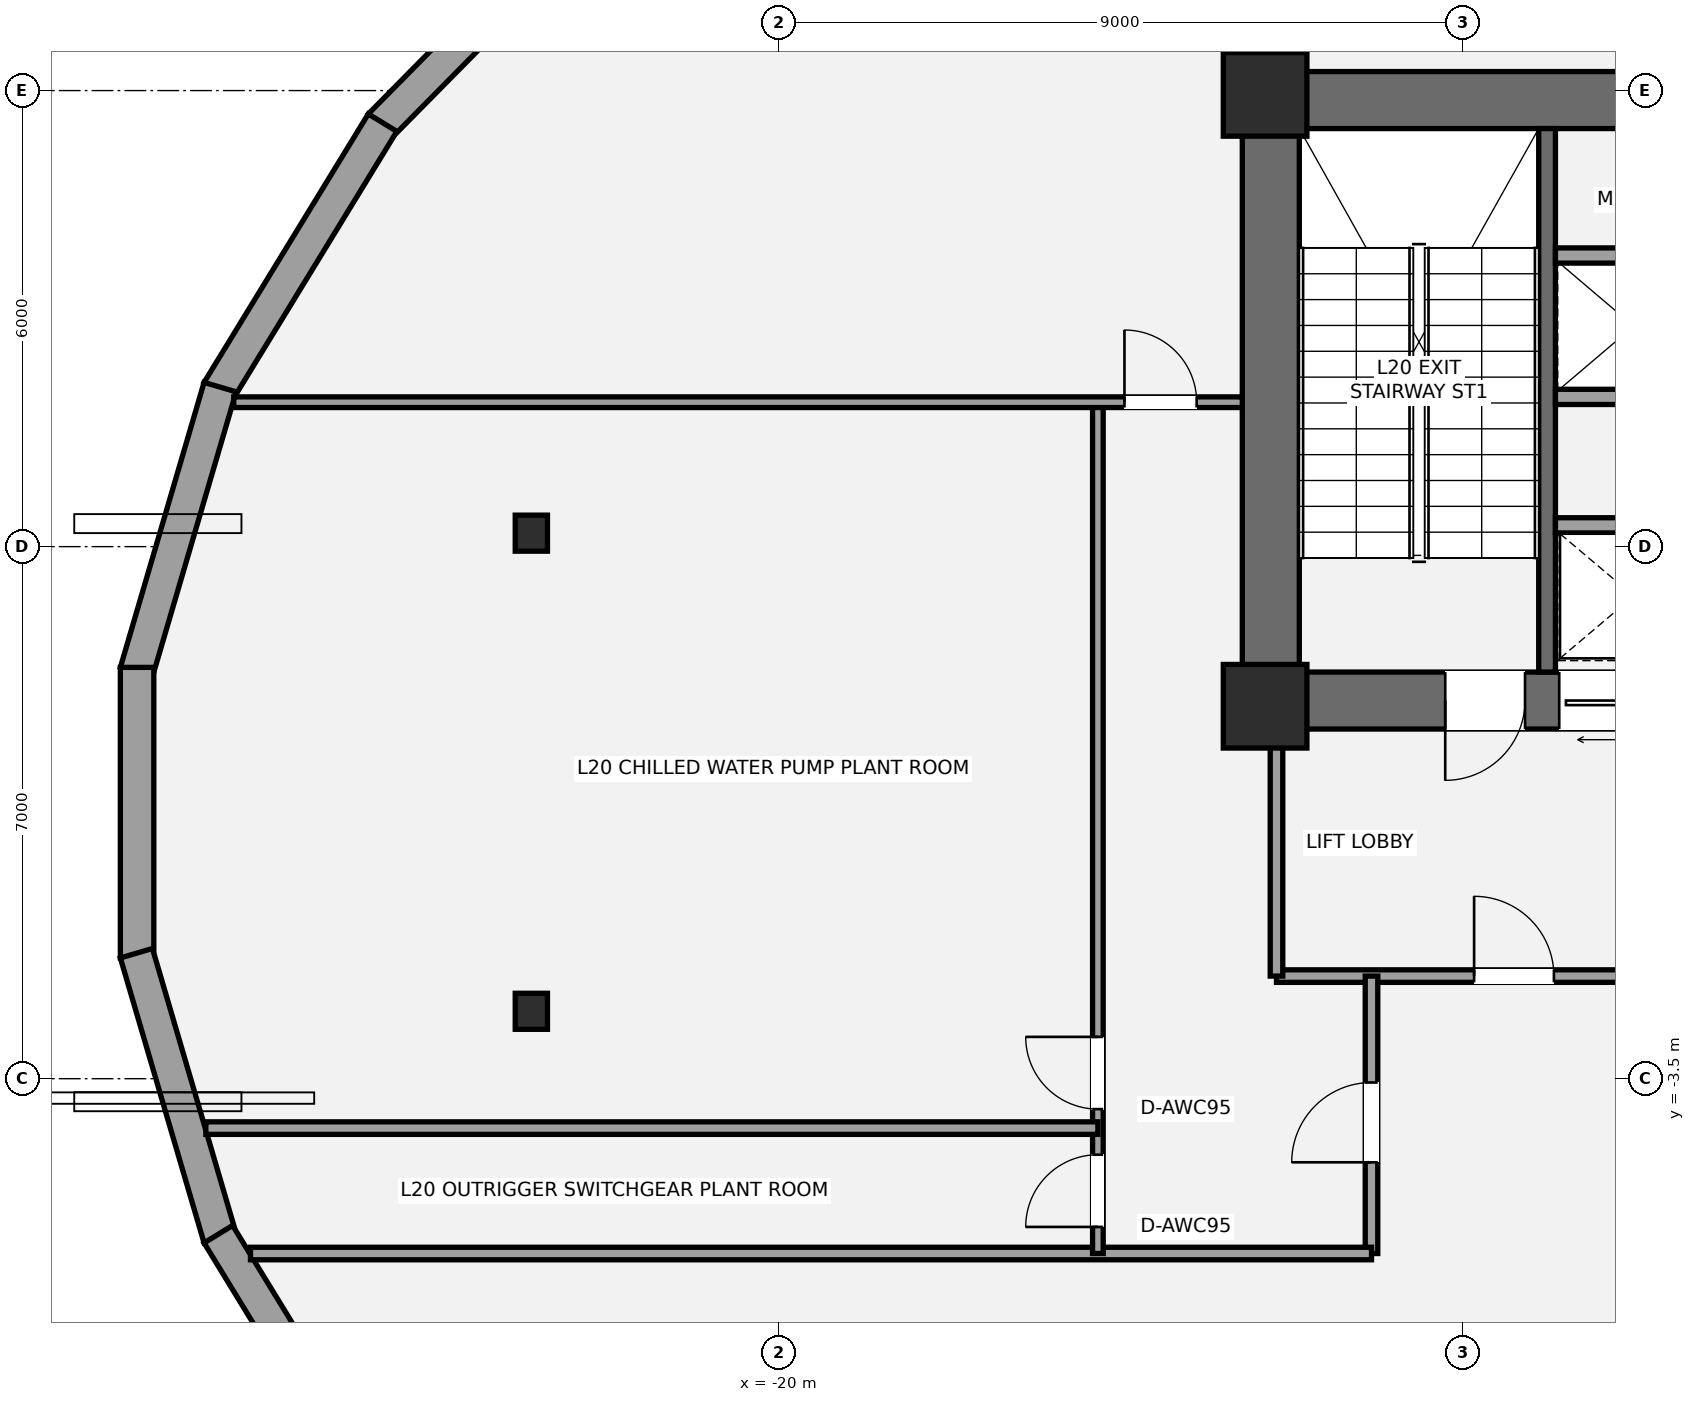
"""IFC4 building model, lengths in metres.
Left out: names, types, materials, properties, quantities, classifications, styles, units other than length and angle.
Written with IfcOpenShell. Run it as: python <this file> out.ifc"""

import sys

from ifc_helpers import new_model, si_unit, direction, frame, frame_2d, origin, origin_2d, place, context, subcontext, project, spatial, rectangle, i_section, extrude, element, fill, save


model = new_model("IFC4")
c1 = context("Model", 3, precision=1e-05, world=origin(), true_north=direction((0.0, 1.0)))
c2 = subcontext(c1, "Body", "Model", "MODEL_VIEW")
j1 = project(units=[si_unit("LENGTHUNIT", "METRE"), si_unit("PLANEANGLEUNIT", "RADIAN")], contexts=[c1])
p1 = place(None, origin())
s1 = spatial("IfcSite", under=j1, at=p1, CompositionType="ELEMENT")
p2 = place(p1, origin())
s2 = spatial("IfcBuilding", under=s1, at=p2, CompositionType="ELEMENT")
p3 = place(p2, frame((0.0, 0.0, 77.4)))
s3 = spatial("IfcBuildingStorey", under=s2, at=p3, CompositionType="ELEMENT", Elevation=77.4)
p4 = place(p3, frame((-13.525, 1.1, 0.0), z_axis=(0.0, 0.0, 1.0), x_axis=(0.0, 1.0, 0.0)))
e1 = element("IfcWall", 1, at=p4, inside=s3, PredefinedType="SHEAR", context=c2, shape_type="SweptSolid", body=[
    extrude(rectangle(XDim=8.65, YDim=0.75, at=frame_2d((4.325, 0.0))), origin(), (0.0, 0.0, 1.0), 4.5),
])
p5 = place(p3, frame((-13.9, 9.375, 0.0), z_axis=(0.0, 0.0, 1.0), x_axis=(1.0, 0.0, 0.0)))
e2 = element("IfcWall", 2, at=p5, inside=s3, PredefinedType="SHEAR", context=c2, shape_type="SweptSolid", body=[
    extrude(rectangle(XDim=9.475, YDim=0.75, at=frame_2d((4.737, 0.0))), origin(), (0.0, 0.0, 1.0), 4.5),
])
p6 = place(p3, frame((-4.825, 1.475, 0.0), z_axis=(0.0, 0.0, 1.0), x_axis=(-1.0, 0.0, 0.0)))
e3 = element("IfcWall", 3, at=p6, inside=s3, PredefinedType="SHEAR", context=c2, shape_type="SweptSolid", body=[
    extrude(rectangle(XDim=9.075, YDim=0.75, at=frame_2d((4.538, 0.0))), origin(), (0.0, 0.0, 1.0), 4.5),
])
p7 = place(p6, frame((5.355, 0.0, 0.0)))
e4 = element("IfcOpeningElement", 4, at=p7, cuts=e3, PredefinedType="OPENING", context=c2, shape_type="SweptSolid", body=[
    extrude(rectangle(XDim=1.05, YDim=2.15, at=frame_2d((0.525, 1.075))), frame((0.0, 0.385, 0.0), z_axis=(0.0, -1.0, 0.0), x_axis=(1.0, 0.0, 0.0)), (0.0, 0.0, 1.0), 0.77),
])
p8 = place(p6, frame((3.805, 0.0, 0.0)))
e5 = element("IfcOpeningElement", 5, at=p8, cuts=e3, PredefinedType="OPENING", context=c2, shape_type="SweptSolid", body=[
    extrude(rectangle(XDim=1.1, YDim=2.2, at=frame_2d((0.55, 1.1))), frame((0.0, 0.385, 0.0), z_axis=(0.0, -1.0, 0.0), x_axis=(1.0, 0.0, 0.0)), (0.0, 0.0, 1.0), 0.77),
])
p9 = place(p3, frame((-9.89, 1.85, 0.0), z_axis=(0.0, 0.0, 1.0), x_axis=(0.0, 1.0, 0.0)))
e6 = element("IfcWall", 6, at=p9, inside=s3, PredefinedType="SHEAR", context=c2, shape_type="SweptSolid", body=[
    extrude(rectangle(XDim=7.15, YDim=0.22, at=frame_2d((3.575, 0.0))), origin(), (0.0, 0.0, 1.0), 4.5),
])
for number, where, z_axis, x_axis in (
    (7, (-13.6, 1.4, 0.0), (0.0, 0.0, 1.0), (1.0, 0.0, 0.0)),
    (8, (-13.6, 9.45, 0.0), (0.0, 0.0, 1.0), (1.0, 0.0, 0.0)),
):
    element("IfcColumn", number, at=place(p3, frame(where, z_axis=z_axis, x_axis=x_axis)), inside=s3, PredefinedType="COLUMN", context=c2, shape_type="SweptSolid", body=[
        extrude(rectangle(XDim=1.1, YDim=1.1, at=origin_2d()), origin(), (0.0, 0.0, 1.0), 4.5),
    ])
for number, where, z_axis, x_axis in (
    (9, (-23.254, 3.677, 0.0), (0.0, 0.0, 1.0), (1.0, 0.0, 0.0)),
    (10, (-23.254, -2.613, 0.0), (0.0, 0.0, 1.0), (1.0, 0.0, 0.0)),
):
    element("IfcColumn", number, at=place(p3, frame(where, z_axis=z_axis, x_axis=x_axis)), inside=s3, PredefinedType="COLUMN", context=c2, shape_type="SweptSolid", body=[
        extrude(i_section(OverallWidth=0.424, OverallDepth=0.474, WebThickness=0.048, FlangeThickness=0.077, at=origin_2d()), origin(), (0.0, 0.0, 1.0), 4.5),
    ])
p10 = place(p3, frame((-25.243, 9.038, 0.0), z_axis=(0.0, 0.0, 1.0), x_axis=(0.702361901729, 0.711820032733, 0.0)))
e11 = element("IfcWall", 11, at=p10, inside=s3, PredefinedType="STANDARD", context=c2, shape_type="SweptSolid", body=[
    extrude(rectangle(XDim=4.466, YDim=0.44, at=frame_2d((2.233, 0.0))), origin(), (0.0, 0.0, 1.0), 3.498),
])
p11 = place(p3, frame((-27.372, 5.546, 0.0), z_axis=(0.0, 0.0, 1.0), x_axis=(0.521891226532, 0.85301204427, 0.0)))
e12 = element("IfcWall", 12, at=p11, inside=s3, PredefinedType="STANDARD", context=c2, shape_type="SweptSolid", body=[
    extrude(rectangle(XDim=4.14, YDim=0.44, at=frame_2d((2.07, 0.0))), origin(), (0.0, 0.0, 1.0), 3.498),
])
p12 = place(p3, frame((-28.45, 1.849, 0.0), z_axis=(0.0, 0.0, 1.0), x_axis=(0.281834819638, 0.959462940629, 0.0)))
e13 = element("IfcWall", 13, at=p12, inside=s3, PredefinedType="STANDARD", context=c2, shape_type="SweptSolid", body=[
    extrude(rectangle(XDim=3.908, YDim=0.44, at=frame_2d((1.954, 0.0))), origin(), (0.0, 0.0, 1.0), 3.498),
])
p13 = place(p3, frame((-28.441, -1.911, 0.0), z_axis=(0.0, 0.0, 1.0), x_axis=(0.0, 1.0, 0.0)))
e14 = element("IfcWall", 14, at=p13, inside=s3, PredefinedType="STANDARD", context=c2, shape_type="SweptSolid", body=[
    extrude(rectangle(XDim=3.823, YDim=0.44, at=frame_2d((1.911, 0.0))), origin(), (0.0, 0.0, 1.0), 3.498),
])
p14 = place(p3, frame((-27.349, -5.599, 0.0), z_axis=(0.0, 0.0, 1.0), x_axis=(-0.281834819638, 0.959462940629, 0.0)))
e15 = element("IfcWall", 15, at=p14, inside=s3, PredefinedType="STANDARD", context=c2, shape_type="SweptSolid", body=[
    extrude(rectangle(XDim=3.908, YDim=0.44, at=frame_2d((1.954, 0.0))), origin(), (0.0, 0.0, 1.0), 3.498),
])
p15 = place(p3, frame((-25.212, -9.077, 0.0), z_axis=(0.0, 0.0, 1.0), x_axis=(-0.521891226532, 0.85301204427, 0.0)))
e16 = element("IfcWall", 16, at=p15, inside=s3, PredefinedType="STANDARD", context=c2, shape_type="SweptSolid", body=[
    extrude(rectangle(XDim=4.14, YDim=0.44, at=frame_2d((2.07, 0.0))), origin(), (0.0, 0.0, 1.0), 3.498),
])
p16 = place(p3, frame((-13.45, -2.15, 0.0), z_axis=(0.0, 0.0, 1.0), x_axis=(1.0, 0.0, 0.0)))
e17 = element("IfcWall", 17, at=p16, inside=s3, PredefinedType="PARTITIONING", context=c2, shape_type="SweptSolid", body=[
    extrude(rectangle(XDim=6.25, YDim=0.165, at=frame_2d((3.125, 0.0))), origin(), (0.0, 0.0, 1.0), 3.733),
])
p17 = place(p16, frame((2.6, 0.0, 0.0)))
e18 = element("IfcOpeningElement", 18, at=p17, cuts=e17, PredefinedType="OPENING", context=c2, shape_type="SweptSolid", body=[
    extrude(rectangle(XDim=1.05, YDim=2.15, at=frame_2d((0.525, 1.075))), frame((0.0, 0.093, 0.0), z_axis=(0.0, -1.0, 0.0), x_axis=(1.0, 0.0, 0.0)), (0.0, 0.0, 1.0), 0.185),
])
p18 = place(p3, frame((-13.45, -2.15, 0.0), z_axis=(0.0, 0.0, 1.0), x_axis=(0.0, 1.0, 0.0)))
e19 = element("IfcWall", 19, at=p18, inside=s3, PredefinedType="PARTITIONING", context=c2, shape_type="SweptSolid", body=[
    extrude(rectangle(XDim=3.3, YDim=0.165, at=frame_2d((1.65, 0.0))), origin(), (0.0, 0.0, 1.0), 2.47),
])
for number, where, z_axis, x_axis in (
    (20, (-9.78, 3.78, 0.0), (0.0, 0.0, 1.0), (1.0, 0.0, 0.0)),
    (21, (-9.78, 5.47, 0.0), (0.0, 0.0, 1.0), (1.0, 0.0, 0.0)),
    (22, (-9.78, 7.33, 0.0), (0.0, 0.0, 1.0), (1.0, 0.0, 0.0)),
):
    element("IfcWall", number, at=place(p3, frame(where, z_axis=z_axis, x_axis=x_axis)), inside=s3, PredefinedType="SOLIDWALL", context=c2, shape_type="SweptSolid", body=[
        extrude(rectangle(XDim=4.205, YDim=0.2, at=frame_2d((2.103, 0.0))), origin(), (0.0, 0.0, 1.0), 4.28),
    ])
p19 = place(p3, frame((-12.2, -5.8, 0.0), z_axis=(0.0, 0.0, 1.0), x_axis=(0.0, 1.0, 0.0)))
e23 = element("IfcWall", 23, at=p19, inside=s3, PredefinedType="PARTITIONING", context=c2, shape_type="SweptSolid", body=[
    extrude(rectangle(XDim=3.65, YDim=0.165, at=frame_2d((1.825, 0.0))), origin(), (0.0, 0.0, 1.0), 4.28),
])
p20 = place(p19, frame((1.2, 0.0, 0.0)))
e24 = element("IfcOpeningElement", 24, at=p20, cuts=e23, PredefinedType="OPENING", context=c2, shape_type="SweptSolid", body=[
    extrude(rectangle(XDim=1.05, YDim=2.15, at=frame_2d((0.525, 1.075))), frame((0.0, 0.093, 0.0), z_axis=(0.0, -1.0, 0.0), x_axis=(1.0, 0.0, 0.0)), (0.0, 0.0, 1.0), 0.185),
])
p21 = place(p3, frame((-26.949, -5.8, 0.0), z_axis=(0.0, 0.0, 1.0), x_axis=(1.0, 0.0, 0.0)))
e25 = element("IfcWall", 25, at=p21, inside=s3, PredefinedType="PARTITIONING", context=c2, shape_type="SweptSolid", body=[
    extrude(rectangle(XDim=14.75, YDim=0.165, at=frame_2d((7.375, 0.0))), origin(), (0.0, 0.0, 1.0), 2.47),
])
p22 = place(p3, frame((-15.8, -5.8, 0.0), z_axis=(0.0, 0.0, 1.0), x_axis=(0.0, 1.0, 0.0)))
e26 = element("IfcWall", 26, at=p22, inside=s3, PredefinedType="PARTITIONING", context=c2, shape_type="SweptSolid", body=[
    extrude(rectangle(XDim=11.2, YDim=0.14, at=frame_2d((5.6, 0.0))), origin(), (0.0, 0.0, 1.0), 2.47),
])
p23 = place(p22, frame((0.35, 0.0, 0.0)))
e27 = element("IfcOpeningElement", 27, at=p23, cuts=e26, PredefinedType="OPENING", context=c2, shape_type="SweptSolid", body=[
    extrude(rectangle(XDim=0.95, YDim=2.15, at=frame_2d((0.475, 1.075))), frame((0.0, 0.08, 0.0), z_axis=(0.0, -1.0, 0.0), x_axis=(1.0, 0.0, 0.0)), (0.0, 0.0, 1.0), 0.16),
])
p24 = place(p22, frame((1.9, 0.0, 0.0)))
e28 = element("IfcOpeningElement", 28, at=p24, cuts=e26, PredefinedType="OPENING", context=c2, shape_type="SweptSolid", body=[
    extrude(rectangle(XDim=0.95, YDim=2.15, at=frame_2d((0.475, 1.075))), frame((0.0, 0.08, 0.0), z_axis=(0.0, -1.0, 0.0), x_axis=(1.0, 0.0, 0.0)), (0.0, 0.0, 1.0), 0.16),
])
p25 = place(p3, frame((-27.169, 5.4, 0.0), z_axis=(0.0, 0.0, 1.0), x_axis=(1.0, 0.0, 0.0)))
e29 = element("IfcWall", 29, at=p25, inside=s3, PredefinedType="PARTITIONING", context=c2, shape_type="SweptSolid", body=[
    extrude(rectangle(XDim=13.27, YDim=0.14, at=frame_2d((6.635, 0.0))), origin(), (0.0, 0.0, 1.0), 4.28),
])
p26 = place(p25, frame((11.719, 0.0, 0.0)))
e30 = element("IfcOpeningElement", 30, at=p26, cuts=e29, PredefinedType="OPENING", context=c2, shape_type="SweptSolid", body=[
    extrude(rectangle(XDim=0.95, YDim=2.15, at=frame_2d((0.475, 1.075))), frame((0.0, 0.08, 0.0), z_axis=(0.0, -1.0, 0.0), x_axis=(1.0, 0.0, 0.0)), (0.0, 0.0, 1.0), 0.16),
])
p27 = place(p3, frame((-27.537, -4.15, 0.0), z_axis=(0.0, 0.0, 1.0), x_axis=(1.0, 0.0, 0.0)))
e31 = element("IfcWall", 31, at=p27, inside=s3, PredefinedType="PARTITIONING", context=c2, shape_type="SweptSolid", body=[
    extrude(rectangle(XDim=11.737, YDim=0.165, at=frame_2d((5.868, 0.0))), origin(), (0.0, 0.0, 1.0), 2.47),
])
p28 = place(p7, origin())
e32 = element("IfcDoor", 32, at=p28, inside=s3, OperationType="SINGLE_SWING_RIGHT", PredefinedType="DOOR", context=c2, shape_type="SweptSolid", body=[
    extrude(rectangle(XDim=1.05, YDim=2.15, at=frame_2d((0.525, 1.075))), frame((0.0, 0.025, 0.0), z_axis=(0.0, -1.0, 0.0), x_axis=(1.0, 0.0, 0.0)), (0.0, 0.0, 1.0), 0.05),
])
fill(e4, e32)
p29 = place(p8, origin())
e33 = element("IfcDoor", 33, at=p29, inside=s3, OperationType="SLIDING_TO_LEFT", PredefinedType="DOOR", context=c2, shape_type="SweptSolid", body=[
    extrude(rectangle(XDim=1.1, YDim=2.2, at=frame_2d((0.55, 1.1))), frame((0.0, 0.025, 0.0), z_axis=(0.0, -1.0, 0.0), x_axis=(1.0, 0.0, 0.0)), (0.0, 0.0, 1.0), 0.05),
])
fill(e5, e33)
p30 = place(p17, origin())
e34 = element("IfcDoor", 34, at=p30, inside=s3, OperationType="SINGLE_SWING_LEFT", PredefinedType="DOOR", context=c2, shape_type="SweptSolid", body=[
    extrude(rectangle(XDim=1.05, YDim=2.15, at=frame_2d((0.525, 1.075))), frame((0.0, 0.025, 0.0), z_axis=(0.0, -1.0, 0.0), x_axis=(1.0, 0.0, 0.0)), (0.0, 0.0, 1.0), 0.05),
])
fill(e18, e34)
p31 = place(p20, origin())
e35 = element("IfcDoor", 35, at=p31, inside=s3, OperationType="SINGLE_SWING_LEFT", PredefinedType="DOOR", context=c2, shape_type="SweptSolid", body=[
    extrude(rectangle(XDim=1.05, YDim=2.15, at=frame_2d((0.525, 1.075))), frame((0.0, 0.025, 0.0), z_axis=(0.0, -1.0, 0.0), x_axis=(1.0, 0.0, 0.0)), (0.0, 0.0, 1.0), 0.05),
])
fill(e24, e35)
p32 = place(p23, origin())
e36 = element("IfcDoor", 36, at=p32, inside=s3, OperationType="SINGLE_SWING_LEFT", PredefinedType="DOOR", context=c2, shape_type="SweptSolid", body=[
    extrude(rectangle(XDim=0.95, YDim=2.15, at=frame_2d((0.475, 1.075))), frame((0.0, 0.025, 0.0), z_axis=(0.0, -1.0, 0.0), x_axis=(1.0, 0.0, 0.0)), (0.0, 0.0, 1.0), 0.05),
])
fill(e27, e36)
p33 = place(p24, origin())
e37 = element("IfcDoor", 37, at=p33, inside=s3, OperationType="SINGLE_SWING_RIGHT", PredefinedType="DOOR", context=c2, shape_type="SweptSolid", body=[
    extrude(rectangle(XDim=0.95, YDim=2.15, at=frame_2d((0.475, 1.075))), frame((0.0, 0.025, 0.0), z_axis=(0.0, -1.0, 0.0), x_axis=(1.0, 0.0, 0.0)), (0.0, 0.0, 1.0), 0.05),
])
fill(e28, e37)
p34 = place(p26, origin())
e38 = element("IfcDoor", 38, at=p34, inside=s3, OperationType="SINGLE_SWING_LEFT", PredefinedType="DOOR", context=c2, shape_type="SweptSolid", body=[
    extrude(rectangle(XDim=0.95, YDim=2.15, at=frame_2d((0.475, 1.075))), frame((0.0, 0.025, 0.0), z_axis=(0.0, -1.0, 0.0), x_axis=(1.0, 0.0, 0.0)), (0.0, 0.0, 1.0), 0.05),
])
fill(e30, e38)
save(model, sys.argv[1])
